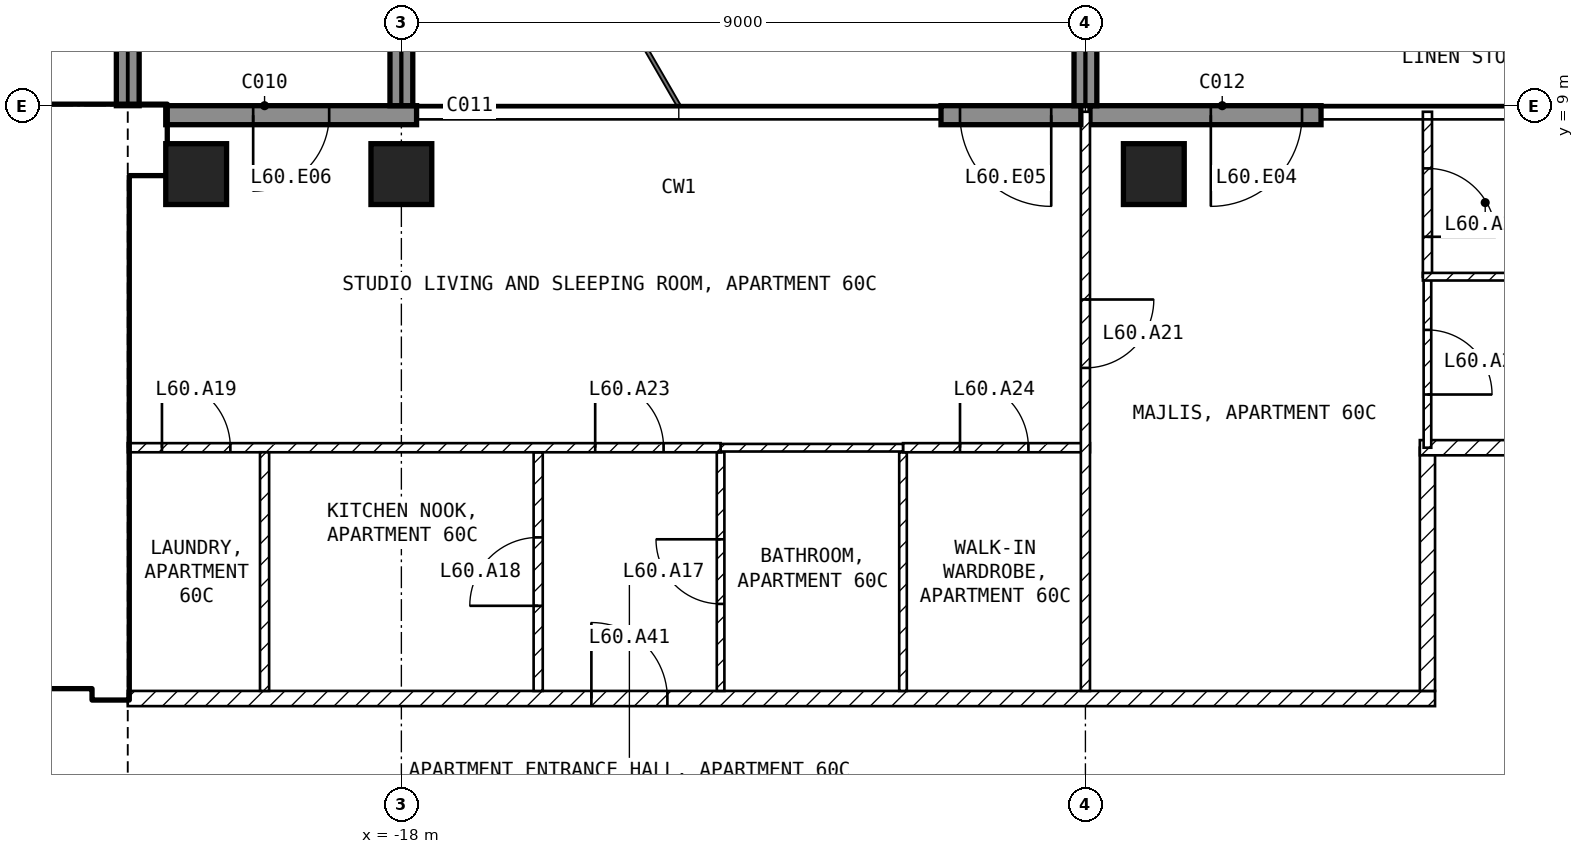
"""IFC4 building model, lengths in metres.
Left out: names, types, materials, properties, quantities, classifications, styles, units other than length and angle.
Written with IfcOpenShell. Run it as: python <this file> out.ifc"""

import sys

from ifc_helpers import new_model, si_unit, direction, frame, frame_2d, origin, origin_2d, place, context, subcontext, project, spatial, rectangle, extrude, element, fill, save


model = new_model("IFC4")
c1 = context("Model", 3, precision=1e-05, world=origin(), true_north=direction((0.0, 1.0)))
c2 = subcontext(c1, "Body", "Model", "MODEL_VIEW")
j1 = project(units=[si_unit("LENGTHUNIT", "METRE"), si_unit("PLANEANGLEUNIT", "RADIAN")], contexts=[c1])
p1 = place(None, origin())
s1 = spatial("IfcSite", under=j1, at=p1, CompositionType="ELEMENT")
p2 = place(p1, origin())
s2 = spatial("IfcBuilding", under=s1, at=p2, CompositionType="ELEMENT")
p3 = place(p2, frame((0.0, 0.0, 239.5)))
s3 = spatial("IfcBuildingStorey", under=s2, at=p3, CompositionType="ELEMENT", Elevation=239.5)
for number, where, z_axis, x_axis in (
    (1, (-20.7, 8.1, -0.25), (0.0, 0.0, 1.0), (1.0, 0.0, 0.0)),
    (2, (-18.0, 8.1, -0.25), (0.0, 0.0, 1.0), (1.0, 0.0, 0.0)),
    (3, (-8.1, 8.1, -0.25), (0.0, 0.0, 1.0), (1.0, 0.0, 0.0)),
):
    element("IfcColumn", number, at=place(p3, frame(where, z_axis=z_axis, x_axis=x_axis)), inside=s3, PredefinedType="COLUMN", context=c2, shape_type="SweptSolid", body=[
        extrude(rectangle(XDim=0.8, YDim=0.8, at=origin_2d()), origin(), (0.0, 0.0, 1.0), 3.5),
    ])
p4 = place(p3, frame((-5.9, 8.875, 0.0), z_axis=(0.0, 0.0, 1.0), x_axis=(-1.0, 0.0, 0.0)))
e4 = element("IfcWall", 4, at=p4, inside=s3, PredefinedType="SOLIDWALL", context=c2, shape_type="SweptSolid", body=[
    extrude(rectangle(XDim=3.04, YDim=0.25, at=frame_2d((1.52, 0.0))), origin(), (0.0, 0.0, 1.0), 3.25),
])
p5 = place(p4, frame((0.25, 0.0, 0.0)))
e5 = element("IfcOpeningElement", 5, at=p5, cuts=e4, PredefinedType="OPENING", context=c2, shape_type="SweptSolid", body=[
    extrude(rectangle(XDim=1.2, YDim=2.4, at=frame_2d((0.6, 1.2))), frame((0.0, 0.135, 0.0), z_axis=(0.0, -1.0, 0.0), x_axis=(1.0, 0.0, 0.0)), (0.0, 0.0, 1.0), 0.27),
])
p6 = place(p3, frame((-9.06, 8.875, 0.0), z_axis=(0.0, 0.0, 1.0), x_axis=(-1.0, 0.0, 0.0)))
e6 = element("IfcWall", 6, at=p6, inside=s3, PredefinedType="SOLIDWALL", context=c2, shape_type="SweptSolid", body=[
    extrude(rectangle(XDim=1.84, YDim=0.25, at=frame_2d((0.92, 0.0))), origin(), (0.0, 0.0, 1.0), 3.25),
])
p7 = place(p6, frame((0.39, 0.0, 0.0)))
e7 = element("IfcOpeningElement", 7, at=p7, cuts=e6, PredefinedType="OPENING", context=c2, shape_type="SweptSolid", body=[
    extrude(rectangle(XDim=1.2, YDim=2.4, at=frame_2d((0.6, 1.2))), frame((0.0, 0.135, 0.0), z_axis=(0.0, -1.0, 0.0), x_axis=(1.0, 0.0, 0.0)), (0.0, 0.0, 1.0), 0.27),
])
p8 = place(p3, frame((-17.8, 8.875, 0.0), z_axis=(0.0, 0.0, 1.0), x_axis=(-1.0, 0.0, 0.0)))
e8 = element("IfcWall", 8, at=p8, inside=s3, PredefinedType="SOLIDWALL", context=c2, shape_type="SweptSolid", body=[
    extrude(rectangle(XDim=3.3, YDim=0.25, at=frame_2d((1.65, 0.0))), origin(), (0.0, 0.0, 1.0), 3.25),
])
p9 = place(p8, frame((1.15, 0.0, 0.0)))
e9 = element("IfcOpeningElement", 9, at=p9, cuts=e8, PredefinedType="OPENING", context=c2, shape_type="SweptSolid", body=[
    extrude(rectangle(XDim=1.0, YDim=2.4, at=frame_2d((0.5, 1.2))), frame((0.0, 0.135, 0.0), z_axis=(0.0, -1.0, 0.0), x_axis=(1.0, 0.0, 0.0)), (0.0, 0.0, 1.0), 0.27),
])
for number, where, z_axis, x_axis in (
    (10, (-21.6, 9.0, 0.0), (0.0, 0.0, 1.0), (0.0, 1.0, 0.0)),
    (11, (-18.0, 9.0, 0.0), (0.0, 0.0, 1.0), (0.0, 1.0, 0.0)),
    (12, (-9.0, 9.0, 0.0), (0.0, 0.0, 1.0), (0.0, 1.0, 0.0)),
):
    element("IfcWall", number, at=place(p3, frame(where, z_axis=z_axis, x_axis=x_axis)), inside=s3, PredefinedType="SOLIDWALL", context=c2, shape_type="SweptSolid", body=[
        extrude(rectangle(XDim=2.7, YDim=0.3, at=frame_2d((1.35, 0.0))), origin(), (0.0, 0.0, 1.0), 3.25),
    ])
p10 = place(p3, frame((-29.75, 8.55, 0.0), z_axis=(0.0, 0.0, 1.0), x_axis=(1.0, 0.0, 0.0)))
e13 = element("IfcWall", 13, at=p10, inside=s3, PredefinedType="SHEAR", context=c2, shape_type="SweptSolid", body=[
    extrude(rectangle(XDim=8.65, YDim=0.9, at=frame_2d((4.325, 0.0))), origin(), (0.0, 0.0, 1.0), 3.25),
])
p11 = place(p3, frame((-21.825, 1.2, 0.0), z_axis=(0.0, 0.0, 1.0), x_axis=(0.0, 1.0, 0.0)))
e14 = element("IfcWall", 14, at=p11, inside=s3, PredefinedType="SHEAR", context=c2, shape_type="SweptSolid", body=[
    extrude(rectangle(XDim=6.9, YDim=0.45, at=frame_2d((3.45, 0.0))), origin(), (0.0, 0.0, 1.0), 3.25),
])
p12 = place(p3, frame((-33.35, 1.45, 0.0), z_axis=(0.0, 0.0, 1.0), x_axis=(1.0, 0.0, 0.0)))
e15 = element("IfcWall", 15, at=p12, inside=s3, PredefinedType="SOLIDWALL", context=c2, shape_type="SweptSolid", body=[
    extrude(rectangle(XDim=11.3, YDim=0.2, at=frame_2d((5.65, 0.0))), origin(), (0.0, 0.0, 1.0), 3.25),
])
p13 = place(p12, frame((9.55, 0.0, 0.0)))
e16 = element("IfcOpeningElement", 16, at=p13, cuts=e15, PredefinedType="OPENING", context=c2, shape_type="SweptSolid", body=[
    extrude(rectangle(XDim=1.0, YDim=2.1, at=frame_2d((0.5, 1.05))), frame((0.0, 0.11, 0.0), z_axis=(0.0, -1.0, 0.0), x_axis=(1.0, 0.0, 0.0)), (0.0, 0.0, 1.0), 0.22),
])
p14 = place(p12, frame((7.05, 0.0, 0.0)))
e17 = element("IfcOpeningElement", 17, at=p14, cuts=e15, PredefinedType="OPENING", context=c2, shape_type="SweptSolid", body=[
    extrude(rectangle(XDim=1.0, YDim=2.1, at=frame_2d((0.5, 1.05))), frame((0.0, 0.11, 0.0), z_axis=(0.0, -1.0, 0.0), x_axis=(1.0, 0.0, 0.0)), (0.0, 0.0, 1.0), 0.22),
])
p15 = place(p12, frame((1.175, 0.0, 0.0)))
e18 = element("IfcOpeningElement", 18, at=p15, cuts=e15, PredefinedType="OPENING", context=c2, shape_type="SweptSolid", body=[
    extrude(rectangle(XDim=0.9, YDim=2.1, at=frame_2d((0.45, 1.05))), frame((0.0, 0.11, 0.0), z_axis=(0.0, -1.0, 0.0), x_axis=(1.0, 0.0, 0.0)), (0.0, 0.0, 1.0), 0.22),
])
p16 = place(p3, frame((-28.35, 5.15, 0.0), z_axis=(0.0, 0.0, 1.0), x_axis=(1.0, 0.0, 0.0)))
e19 = element("IfcWall", 19, at=p16, inside=s3, PredefinedType="SOLIDWALL", context=c2, shape_type="SweptSolid", body=[
    extrude(rectangle(XDim=6.3, YDim=0.2, at=frame_2d((3.15, 0.0))), origin(), (0.0, 0.0, 1.0), 3.25),
])
p17 = place(p16, frame((5.1, 0.0, 0.0)))
e20 = element("IfcOpeningElement", 20, at=p17, cuts=e19, PredefinedType="OPENING", context=c2, shape_type="SweptSolid", body=[
    extrude(rectangle(XDim=1.0, YDim=2.1, at=frame_2d((0.5, 1.05))), frame((0.0, 0.11, 0.0), z_axis=(0.0, -1.0, 0.0), x_axis=(1.0, 0.0, 0.0)), (0.0, 0.0, 1.0), 0.22),
])
p18 = place(p3, frame((-21.6, 1.2, 0.0), z_axis=(0.0, 0.0, 1.0), x_axis=(1.0, 0.0, 0.0)))
e21 = element("IfcWall", 21, at=p18, inside=s3, PredefinedType="PARTITIONING", context=c2, shape_type="SweptSolid", body=[
    extrude(rectangle(XDim=17.2, YDim=0.2, at=frame_2d((8.6, 0.0))), origin(), (0.0, 0.0, 1.0), 3.25),
])
p19 = place(p18, frame((6.1, 0.0, 0.0)))
e22 = element("IfcOpeningElement", 22, at=p19, cuts=e21, PredefinedType="OPENING", context=c2, shape_type="SweptSolid", body=[
    extrude(rectangle(XDim=1.0, YDim=2.1, at=frame_2d((0.5, 1.05))), frame((0.0, 0.11, 0.0), z_axis=(0.0, -1.0, 0.0), x_axis=(1.0, 0.0, 0.0)), (0.0, 0.0, 1.0), 0.22),
])
p20 = place(p3, frame((-4.5, 1.3, 0.0), z_axis=(0.0, 0.0, 1.0), x_axis=(0.0, 1.0, 0.0)))
e23 = element("IfcWall", 23, at=p20, inside=s3, PredefinedType="PARTITIONING", context=c2, shape_type="SweptSolid", body=[
    extrude(rectangle(XDim=3.2, YDim=0.2, at=frame_2d((1.6, 0.0))), origin(), (0.0, 0.0, 1.0), 3.25),
])
p21 = place(p3, frame((-4.6, 4.5, 0.0), z_axis=(0.0, 0.0, 1.0), x_axis=(1.0, 0.0, 0.0)))
e24 = element("IfcWall", 24, at=p21, inside=s3, PredefinedType="PARTITIONING", context=c2, shape_type="SweptSolid", body=[
    extrude(rectangle(XDim=3.5, YDim=0.2, at=frame_2d((1.75, 0.0))), origin(), (0.0, 0.0, 1.0), 3.25),
])
p22 = place(p3, frame((-11.4, 1.3, 0.0), z_axis=(0.0, 0.0, 1.0), x_axis=(0.0, 1.0, 0.0)))
e25 = element("IfcWall", 25, at=p22, inside=s3, PredefinedType="PARTITIONING", context=c2, shape_type="SweptSolid", body=[
    extrude(rectangle(XDim=3.14, YDim=0.1, at=frame_2d((1.57, 0.0))), origin(), (0.0, 0.0, 1.0), 3.25),
])
p23 = place(p3, frame((-11.4, 4.5, 0.0), z_axis=(0.0, 0.0, 1.0), x_axis=(1.0, 0.0, 0.0)))
e26 = element("IfcWall", 26, at=p23, inside=s3, PredefinedType="PARTITIONING", context=c2, shape_type="SweptSolid", body=[
    extrude(rectangle(XDim=2.46, YDim=0.12, at=frame_2d((1.23, 0.0))), origin(), (0.0, 0.0, 1.0), 3.25),
])
p24 = place(p23, frame((0.75, 0.0, 0.0)))
e27 = element("IfcOpeningElement", 27, at=p24, cuts=e26, PredefinedType="OPENING", context=c2, shape_type="SweptSolid", body=[
    extrude(rectangle(XDim=0.9, YDim=2.1, at=frame_2d((0.45, 1.05))), frame((0.0, 0.07, 0.0), z_axis=(0.0, -1.0, 0.0), x_axis=(1.0, 0.0, 0.0)), (0.0, 0.0, 1.0), 0.14),
])
p25 = place(p3, frame((-9.0, 8.92, 0.0), z_axis=(0.0, 0.0, 1.0), x_axis=(0.0, -1.0, 0.0)))
e28 = element("IfcWall", 28, at=p25, inside=s3, PredefinedType="PARTITIONING", context=c2, shape_type="SweptSolid", body=[
    extrude(rectangle(XDim=7.62, YDim=0.12, at=frame_2d((3.81, 0.0))), origin(), (0.0, 0.0, 1.0), 3.25),
])
p26 = place(p25, frame((2.47, 0.0, 0.0)))
e29 = element("IfcOpeningElement", 29, at=p26, cuts=e28, PredefinedType="OPENING", context=c2, shape_type="SweptSolid", body=[
    extrude(rectangle(XDim=0.9, YDim=2.1, at=frame_2d((0.45, 1.05))), frame((0.0, 0.07, 0.0), z_axis=(0.0, -1.0, 0.0), x_axis=(1.0, 0.0, 0.0)), (0.0, 0.0, 1.0), 0.14),
])
p27 = place(p3, frame((-13.8, 1.3, 0.0), z_axis=(0.0, 0.0, 1.0), x_axis=(0.0, 1.0, 0.0)))
e30 = element("IfcWall", 30, at=p27, inside=s3, PredefinedType="PARTITIONING", context=c2, shape_type="SweptSolid", body=[
    extrude(rectangle(XDim=3.14, YDim=0.1, at=frame_2d((1.57, 0.0))), origin(), (0.0, 0.0, 1.0), 3.25),
])
p28 = place(p27, frame((1.145, 0.0, 0.0)))
e31 = element("IfcOpeningElement", 31, at=p28, cuts=e30, PredefinedType="OPENING", context=c2, shape_type="SweptSolid", body=[
    extrude(rectangle(XDim=0.85, YDim=2.1, at=frame_2d((0.425, 1.05))), frame((0.0, 0.06, 0.0), z_axis=(0.0, -1.0, 0.0), x_axis=(1.0, 0.0, 0.0)), (0.0, 0.0, 1.0), 0.12),
])
p29 = place(p3, frame((-13.8, 4.5, 0.0), z_axis=(0.0, 0.0, 1.0), x_axis=(1.0, 0.0, 0.0)))
e32 = element("IfcWall", 32, at=p29, inside=s3, PredefinedType="PARTITIONING", context=c2, shape_type="SweptSolid", body=[
    extrude(rectangle(XDim=2.4, YDim=0.1, at=frame_2d((1.2, 0.0))), origin(), (0.0, 0.0, 1.0), 3.25),
])
p30 = place(p3, frame((-16.2, 1.3, 0.0), z_axis=(0.0, 0.0, 1.0), x_axis=(0.0, 1.0, 0.0)))
e33 = element("IfcWall", 33, at=p30, inside=s3, PredefinedType="PARTITIONING", context=c2, shape_type="SweptSolid", body=[
    extrude(rectangle(XDim=3.14, YDim=0.12, at=frame_2d((1.57, 0.0))), origin(), (0.0, 0.0, 1.0), 3.25),
])
p31 = place(p30, frame((1.12, 0.0, 0.0)))
e34 = element("IfcOpeningElement", 34, at=p31, cuts=e33, PredefinedType="OPENING", context=c2, shape_type="SweptSolid", body=[
    extrude(rectangle(XDim=0.9, YDim=2.1, at=frame_2d((0.45, 1.05))), frame((0.0, 0.07, 0.0), z_axis=(0.0, -1.0, 0.0), x_axis=(1.0, 0.0, 0.0)), (0.0, 0.0, 1.0), 0.14),
])
p32 = place(p3, frame((-21.6, 4.5, 0.0), z_axis=(0.0, 0.0, 1.0), x_axis=(1.0, 0.0, 0.0)))
e35 = element("IfcWall", 35, at=p32, inside=s3, PredefinedType="PARTITIONING", context=c2, shape_type="SweptSolid", body=[
    extrude(rectangle(XDim=7.8, YDim=0.12, at=frame_2d((3.9, 0.0))), origin(), (0.0, 0.0, 1.0), 3.25),
])
p33 = place(p32, frame((0.45, 0.0, 0.0)))
e36 = element("IfcOpeningElement", 36, at=p33, cuts=e35, PredefinedType="OPENING", context=c2, shape_type="SweptSolid", body=[
    extrude(rectangle(XDim=0.9, YDim=2.1, at=frame_2d((0.45, 1.05))), frame((0.0, 0.07, 0.0), z_axis=(0.0, -1.0, 0.0), x_axis=(1.0, 0.0, 0.0)), (0.0, 0.0, 1.0), 0.14),
])
p34 = place(p32, frame((6.15, 0.0, 0.0)))
e37 = element("IfcOpeningElement", 37, at=p34, cuts=e35, PredefinedType="OPENING", context=c2, shape_type="SweptSolid", body=[
    extrude(rectangle(XDim=0.9, YDim=2.1, at=frame_2d((0.45, 1.05))), frame((0.0, 0.07, 0.0), z_axis=(0.0, -1.0, 0.0), x_axis=(1.0, 0.0, 0.0)), (0.0, 0.0, 1.0), 0.14),
])
p35 = place(p3, frame((-19.8, 1.3, 0.0), z_axis=(0.0, 0.0, 1.0), x_axis=(0.0, 1.0, 0.0)))
e38 = element("IfcWall", 38, at=p35, inside=s3, PredefinedType="PARTITIONING", context=c2, shape_type="SweptSolid", body=[
    extrude(rectangle(XDim=3.14, YDim=0.12, at=frame_2d((1.57, 0.0))), origin(), (0.0, 0.0, 1.0), 3.25),
])
p36 = place(p3, frame((-4.5, 6.75, 0.0), z_axis=(0.0, 0.0, 1.0), x_axis=(0.0, -1.0, 0.0)))
e39 = element("IfcWall", 39, at=p36, inside=s3, PredefinedType="PARTITIONING", context=c2, shape_type="SweptSolid", body=[
    extrude(rectangle(XDim=2.25, YDim=0.1, at=frame_2d((1.125, 0.0))), origin(), (0.0, 0.0, 1.0), 3.25),
])
p37 = place(p36, frame((0.7, 0.0, 0.0)))
e40 = element("IfcOpeningElement", 40, at=p37, cuts=e39, PredefinedType="OPENING", context=c2, shape_type="SweptSolid", body=[
    extrude(rectangle(XDim=0.85, YDim=2.1, at=frame_2d((0.425, 1.05))), frame((0.0, 0.06, 0.0), z_axis=(0.0, -1.0, 0.0), x_axis=(1.0, 0.0, 0.0)), (0.0, 0.0, 1.0), 0.12),
])
p38 = place(p3, frame((-4.5, 8.92, 0.0), z_axis=(0.0, 0.0, 1.0), x_axis=(0.0, -1.0, 0.0)))
e41 = element("IfcWall", 41, at=p38, inside=s3, PredefinedType="PARTITIONING", context=c2, shape_type="SweptSolid", body=[
    extrude(rectangle(XDim=2.17, YDim=0.12, at=frame_2d((1.085, 0.0))), origin(), (0.0, 0.0, 1.0), 3.25),
])
p39 = place(p38, frame((0.745, 0.0, 0.0)))
e42 = element("IfcOpeningElement", 42, at=p39, cuts=e41, PredefinedType="OPENING", context=c2, shape_type="SweptSolid", body=[
    extrude(rectangle(XDim=0.9, YDim=2.1, at=frame_2d((0.45, 1.05))), frame((0.0, 0.07, 0.0), z_axis=(0.0, -1.0, 0.0), x_axis=(1.0, 0.0, 0.0)), (0.0, 0.0, 1.0), 0.14),
])
p40 = place(p3, frame((-4.56, 6.75, 0.0), z_axis=(0.0, 0.0, 1.0), x_axis=(1.0, 0.0, 0.0)))
e43 = element("IfcWall", 43, at=p40, inside=s3, PredefinedType="PARTITIONING", context=c2, shape_type="SweptSolid", body=[
    extrude(rectangle(XDim=3.46, YDim=0.1, at=frame_2d((1.73, 0.0))), origin(), (0.0, 0.0, 1.0), 3.25),
])
p41 = place(p5, origin())
e44 = element("IfcDoor", 44, at=p41, inside=s3, OperationType="SINGLE_SWING_RIGHT", PredefinedType="DOOR", context=c2, shape_type="SweptSolid", body=[
    extrude(rectangle(XDim=1.2, YDim=2.4, at=frame_2d((0.6, 1.2))), frame((0.0, 0.025, 0.0), z_axis=(0.0, -1.0, 0.0), x_axis=(1.0, 0.0, 0.0)), (0.0, 0.0, 1.0), 0.05),
])
fill(e5, e44)
p42 = place(p7, origin())
e45 = element("IfcDoor", 45, at=p42, inside=s3, OperationType="SINGLE_SWING_LEFT", PredefinedType="DOOR", context=c2, shape_type="SweptSolid", body=[
    extrude(rectangle(XDim=1.2, YDim=2.4, at=frame_2d((0.6, 1.2))), frame((0.0, 0.025, 0.0), z_axis=(0.0, -1.0, 0.0), x_axis=(1.0, 0.0, 0.0)), (0.0, 0.0, 1.0), 0.05),
])
fill(e7, e45)
p43 = place(p9, origin())
e46 = element("IfcDoor", 46, at=p43, inside=s3, OperationType="SINGLE_SWING_RIGHT", PredefinedType="DOOR", context=c2, shape_type="SweptSolid", body=[
    extrude(rectangle(XDim=1.0, YDim=2.4, at=frame_2d((0.5, 1.2))), frame((0.0, 0.025, 0.0), z_axis=(0.0, -1.0, 0.0), x_axis=(1.0, 0.0, 0.0)), (0.0, 0.0, 1.0), 0.05),
])
fill(e9, e46)
p44 = place(p17, origin())
e47 = element("IfcDoor", 47, at=p44, inside=s3, OperationType="SINGLE_SWING_LEFT", PredefinedType="DOOR", context=c2, shape_type="SweptSolid", body=[
    extrude(rectangle(XDim=1.0, YDim=2.1, at=frame_2d((0.5, 1.05))), frame((0.0, 0.025, 0.0), z_axis=(0.0, -1.0, 0.0), x_axis=(1.0, 0.0, 0.0)), (0.0, 0.0, 1.0), 0.05),
])
fill(e20, e47)
p45 = place(p28, origin())
e48 = element("IfcDoor", 48, at=p45, inside=s3, OperationType="SINGLE_SWING_RIGHT", PredefinedType="DOOR", context=c2, shape_type="SweptSolid", body=[
    extrude(rectangle(XDim=0.85, YDim=2.1, at=frame_2d((0.425, 1.05))), frame((0.0, 0.025, 0.0), z_axis=(0.0, -1.0, 0.0), x_axis=(1.0, 0.0, 0.0)), (0.0, 0.0, 1.0), 0.05),
])
fill(e31, e48)
p46 = place(p31, origin())
e49 = element("IfcDoor", 49, at=p46, inside=s3, OperationType="SINGLE_SWING_LEFT", PredefinedType="DOOR", context=c2, shape_type="SweptSolid", body=[
    extrude(rectangle(XDim=0.9, YDim=2.1, at=frame_2d((0.45, 1.05))), frame((0.0, 0.025, 0.0), z_axis=(0.0, -1.0, 0.0), x_axis=(1.0, 0.0, 0.0)), (0.0, 0.0, 1.0), 0.05),
])
fill(e34, e49)
p47 = place(p33, origin())
e50 = element("IfcDoor", 50, at=p47, inside=s3, OperationType="SINGLE_SWING_LEFT", PredefinedType="DOOR", context=c2, shape_type="SweptSolid", body=[
    extrude(rectangle(XDim=0.9, YDim=2.1, at=frame_2d((0.45, 1.05))), frame((0.0, 0.025, 0.0), z_axis=(0.0, -1.0, 0.0), x_axis=(1.0, 0.0, 0.0)), (0.0, 0.0, 1.0), 0.05),
])
fill(e36, e50)
p48 = place(p39, origin())
e51 = element("IfcDoor", 51, at=p48, inside=s3, OperationType="SINGLE_SWING_RIGHT", PredefinedType="DOOR", context=c2, shape_type="SweptSolid", body=[
    extrude(rectangle(XDim=0.9, YDim=2.1, at=frame_2d((0.45, 1.05))), frame((0.0, 0.025, 0.0), z_axis=(0.0, -1.0, 0.0), x_axis=(1.0, 0.0, 0.0)), (0.0, 0.0, 1.0), 0.05),
])
fill(e42, e51)
p49 = place(p26, origin())
e52 = element("IfcDoor", 52, at=p49, inside=s3, OperationType="SINGLE_SWING_LEFT", PredefinedType="DOOR", context=c2, shape_type="SweptSolid", body=[
    extrude(rectangle(XDim=0.9, YDim=2.1, at=frame_2d((0.45, 1.05))), frame((0.0, 0.025, 0.0), z_axis=(0.0, -1.0, 0.0), x_axis=(1.0, 0.0, 0.0)), (0.0, 0.0, 1.0), 0.05),
])
fill(e29, e52)
p50 = place(p37, origin())
e53 = element("IfcDoor", 53, at=p50, inside=s3, OperationType="SINGLE_SWING_RIGHT", PredefinedType="DOOR", context=c2, shape_type="SweptSolid", body=[
    extrude(rectangle(XDim=0.85, YDim=2.1, at=frame_2d((0.425, 1.05))), frame((0.0, 0.025, 0.0), z_axis=(0.0, -1.0, 0.0), x_axis=(1.0, 0.0, 0.0)), (0.0, 0.0, 1.0), 0.05),
])
fill(e40, e53)
p51 = place(p34, origin())
e54 = element("IfcDoor", 54, at=p51, inside=s3, OperationType="SINGLE_SWING_LEFT", PredefinedType="DOOR", context=c2, shape_type="SweptSolid", body=[
    extrude(rectangle(XDim=0.9, YDim=2.1, at=frame_2d((0.45, 1.05))), frame((0.0, 0.025, 0.0), z_axis=(0.0, -1.0, 0.0), x_axis=(1.0, 0.0, 0.0)), (0.0, 0.0, 1.0), 0.05),
])
fill(e37, e54)
p52 = place(p24, origin())
e55 = element("IfcDoor", 55, at=p52, inside=s3, OperationType="SINGLE_SWING_LEFT", PredefinedType="DOOR", context=c2, shape_type="SweptSolid", body=[
    extrude(rectangle(XDim=0.9, YDim=2.1, at=frame_2d((0.45, 1.05))), frame((0.0, 0.025, 0.0), z_axis=(0.0, -1.0, 0.0), x_axis=(1.0, 0.0, 0.0)), (0.0, 0.0, 1.0), 0.05),
])
fill(e27, e55)
p53 = place(p19, origin())
e56 = element("IfcDoor", 56, at=p53, inside=s3, OperationType="SINGLE_SWING_LEFT", PredefinedType="DOOR", context=c2, shape_type="SweptSolid", body=[
    extrude(rectangle(XDim=1.0, YDim=2.1, at=frame_2d((0.5, 1.05))), frame((0.0, 0.025, 0.0), z_axis=(0.0, -1.0, 0.0), x_axis=(1.0, 0.0, 0.0)), (0.0, 0.0, 1.0), 0.05),
])
fill(e22, e56)
save(model, sys.argv[1])
